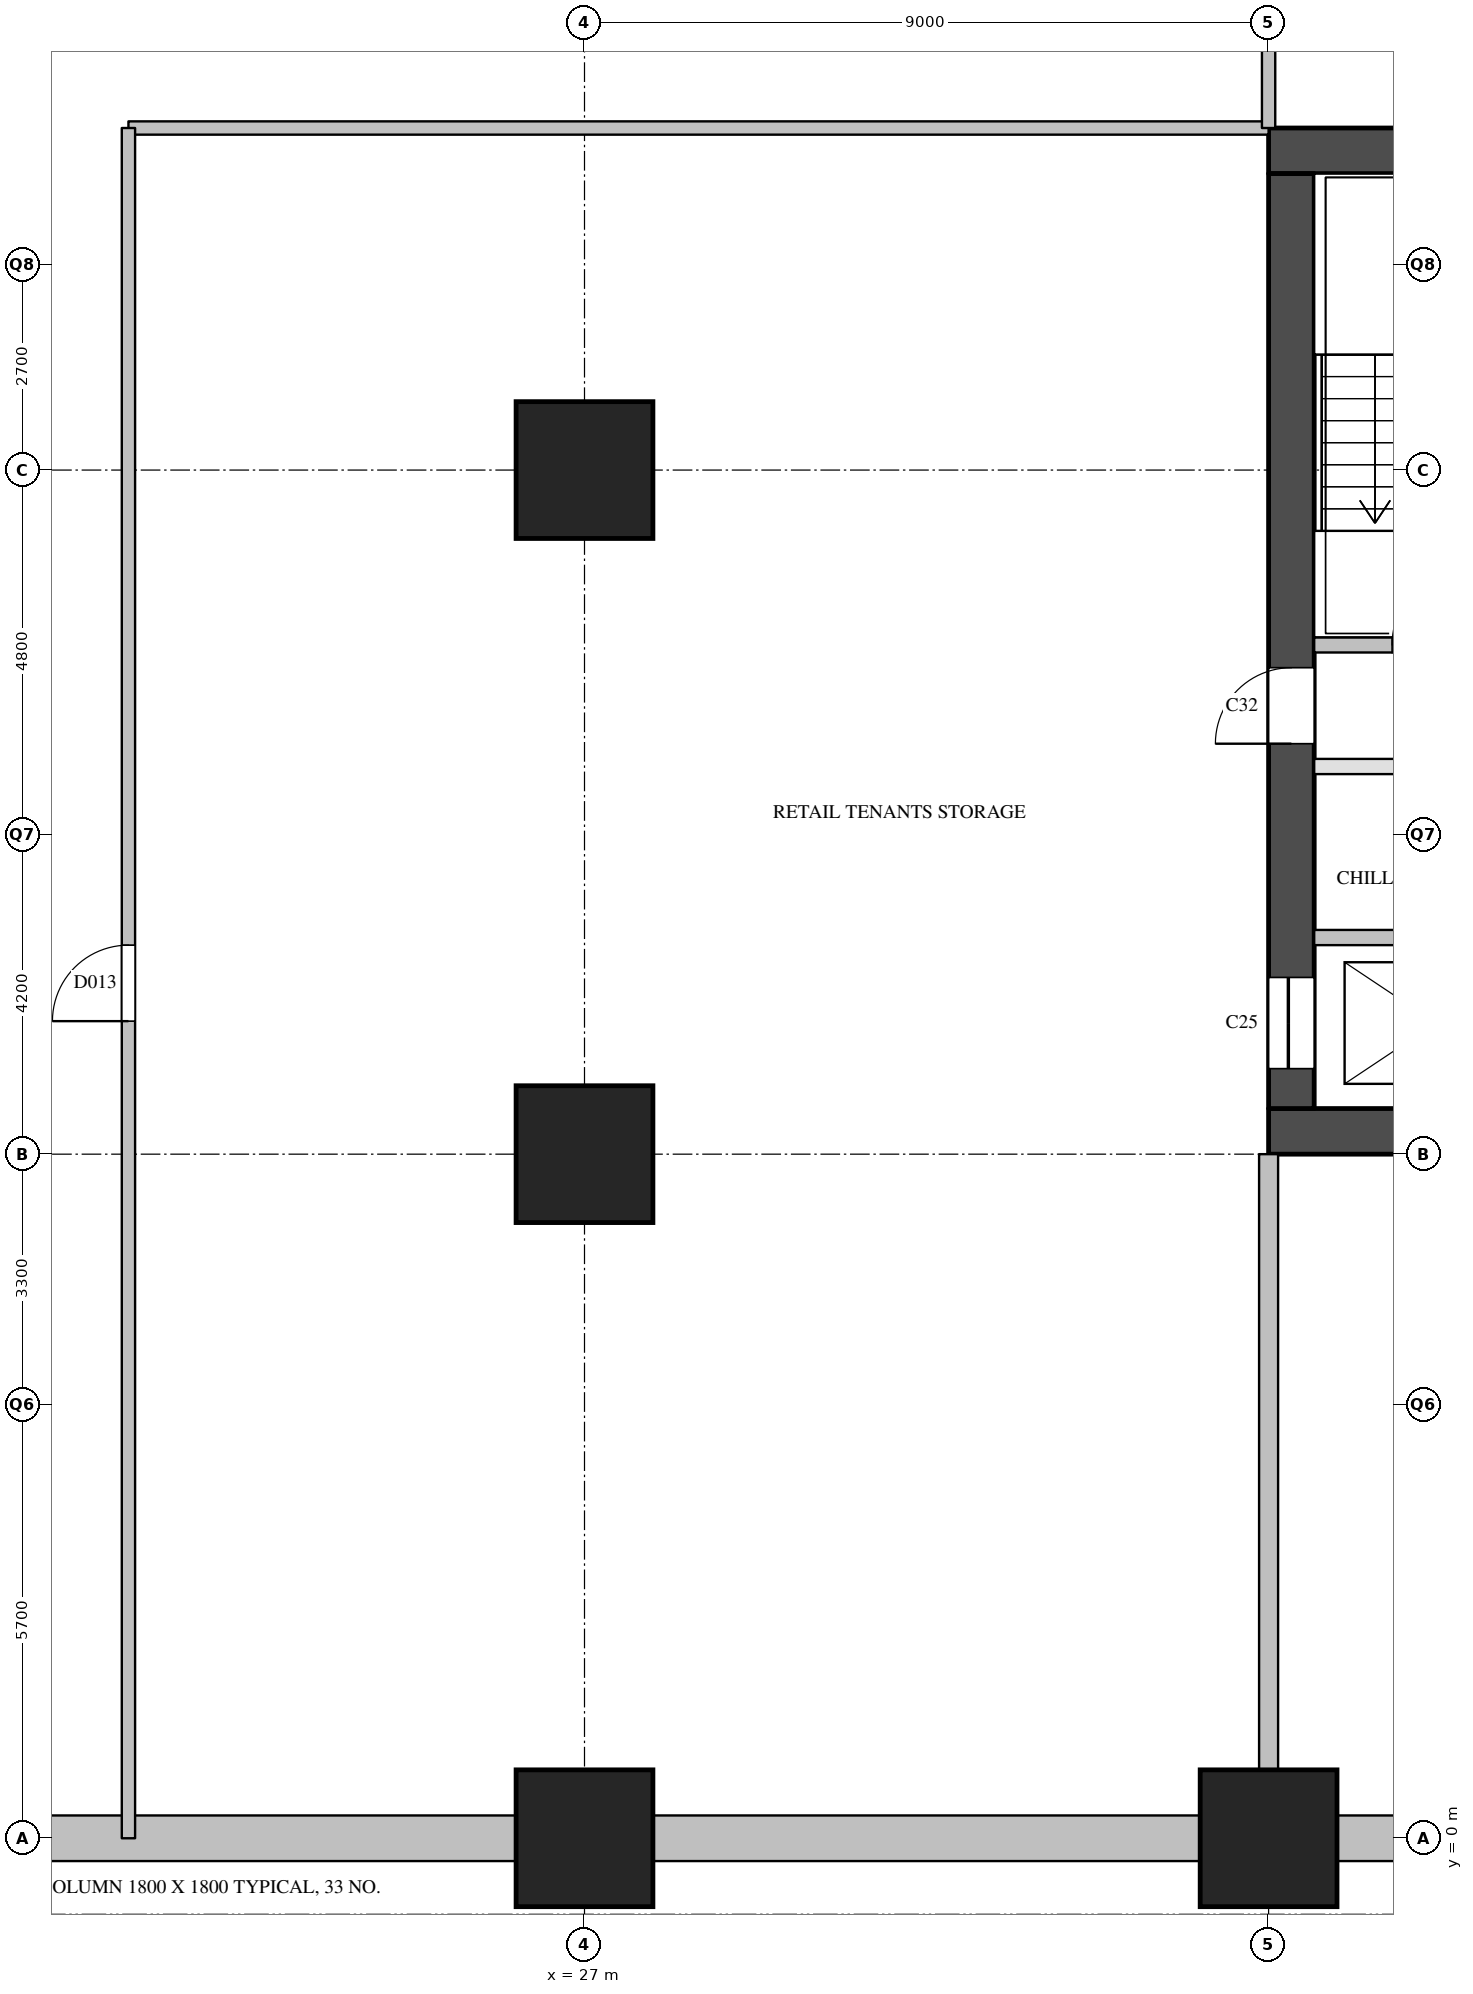
"""IFC4 building model, lengths in metres.
Left out: names, types, materials, properties, quantities, classifications, styles, units other than length and angle.
Written with IfcOpenShell. Run it as: python <this file> out.ifc"""

import sys

from ifc_helpers import new_model, si_unit, direction, frame, frame_2d, origin, origin_2d, place, context, subcontext, project, spatial, rectangle, extrude, element, fill, save


model = new_model("IFC4")
c1 = context("Model", 3, precision=1e-05, world=origin(), true_north=direction((0.0, 1.0)))
c2 = subcontext(c1, "Body", "Model", "MODEL_VIEW")
j1 = project(units=[si_unit("LENGTHUNIT", "METRE"), si_unit("PLANEANGLEUNIT", "RADIAN")], contexts=[c1])
p1 = place(None, origin())
s1 = spatial("IfcSite", under=j1, at=p1, CompositionType="ELEMENT")
p2 = place(p1, origin())
s2 = spatial("IfcBuilding", under=s1, at=p2, CompositionType="ELEMENT")
p3 = place(p2, frame((0.0, 0.0, -6.0)))
s3 = spatial("IfcBuildingStorey", under=s2, at=p3, CompositionType="ELEMENT", Elevation=-6.0)
for number, where, z_axis, x_axis in (
    (1, (27.0, 0.0, 0.0), (0.0, 0.0, 1.0), (1.0, 0.0, 0.0)),
    (2, (27.0, 9.0, 0.0), (0.0, 0.0, 1.0), (1.0, 0.0, 0.0)),
    (3, (27.0, 18.0, 0.0), (0.0, 0.0, 1.0), (1.0, 0.0, 0.0)),
    (4, (36.0, 0.0, 0.0), (0.0, 0.0, 1.0), (1.0, 0.0, 0.0)),
):
    element("IfcColumn", number, at=place(p3, frame(where, z_axis=z_axis, x_axis=x_axis)), inside=s3, PredefinedType="COLUMN", context=c2, shape_type="SweptSolid", body=[
        extrude(rectangle(XDim=1.8, YDim=1.8, at=origin_2d()), origin(), (0.0, 0.0, 1.0), 6.0),
    ])
for number, where, z_axis, x_axis in (
    (5, (18.9, 0.0, 0.0), (0.0, 0.0, 1.0), (1.0, 0.0, 0.0)),
    (6, (27.9, 0.0, 0.0), (0.0, 0.0, 1.0), (1.0, 0.0, 0.0)),
    (7, (36.9, 0.0, 0.0), (0.0, 0.0, 1.0), (1.0, 0.0, 0.0)),
):
    element("IfcWall", number, at=place(p3, frame(where, z_axis=z_axis, x_axis=x_axis)), inside=s3, PredefinedType="SOLIDWALL", context=c2, shape_type="SweptSolid", body=[
        extrude(rectangle(XDim=7.2, YDim=0.6, at=frame_2d((3.6, 0.0))), origin(), (0.0, 0.0, 1.0), 5.59),
    ])
for number, where, z_axis, x_axis in (
    (8, (36.0, 9.3, 0.0), (0.0, 0.0, 1.0), (1.0, 0.0, 0.0)),
    (9, (36.0, 22.2, 0.0), (0.0, 0.0, 1.0), (1.0, 0.0, 0.0)),
):
    element("IfcWall", number, at=place(p3, frame(where, z_axis=z_axis, x_axis=x_axis)), inside=s3, PredefinedType="SHEAR", context=c2, shape_type="SweptSolid", body=[
        extrude(rectangle(XDim=9.0, YDim=0.6, at=frame_2d((4.5, 0.0))), origin(), (0.0, 0.0, 1.0), 5.59),
    ])
p4 = place(p3, frame((36.3, 9.6, 0.0), z_axis=(0.0, 0.0, 1.0), x_axis=(0.0, 1.0, 0.0)))
e10 = element("IfcWall", 10, at=p4, inside=s3, PredefinedType="SHEAR", context=c2, shape_type="SweptSolid", body=[
    extrude(rectangle(XDim=12.3, YDim=0.6, at=frame_2d((6.15, 0.0))), origin(), (0.0, 0.0, 1.0), 5.59),
])
p5 = place(p4, frame((0.525, 0.0, 0.0)))
e11 = element("IfcOpeningElement", 11, at=p5, cuts=e10, PredefinedType="OPENING", context=c2, shape_type="SweptSolid", body=[
    extrude(rectangle(XDim=1.2, YDim=2.1, at=frame_2d((0.6, 1.05))), frame((0.0, 0.31, 0.0), z_axis=(0.0, -1.0, 0.0), x_axis=(1.0, 0.0, 0.0)), (0.0, 0.0, 1.0), 0.62),
])
p6 = place(p4, frame((4.8, 0.0, 0.0)))
e12 = element("IfcOpeningElement", 12, at=p6, cuts=e10, PredefinedType="OPENING", context=c2, shape_type="SweptSolid", body=[
    extrude(rectangle(XDim=1.0, YDim=2.1, at=frame_2d((0.5, 1.05))), frame((0.0, 0.31, 0.0), z_axis=(0.0, -1.0, 0.0), x_axis=(1.0, 0.0, 0.0)), (0.0, 0.0, 1.0), 0.62),
])
p7 = place(p3, frame((36.6, 11.85, 0.0), z_axis=(0.0, 0.0, 1.0), x_axis=(1.0, 0.0, 0.0)))
e13 = element("IfcWall", 13, at=p7, inside=s3, PredefinedType="SOLIDWALL", context=c2, shape_type="SweptSolid", body=[
    extrude(rectangle(XDim=3.2, YDim=0.2, at=frame_2d((1.6, 0.0))), origin(), (0.0, 0.0, 1.0), 5.59),
])
p8 = place(p3, frame((36.6, 14.1, 0.0), z_axis=(0.0, 0.0, 1.0), x_axis=(1.0, 0.0, 0.0)))
e14 = element("IfcWall", 14, at=p8, inside=s3, PredefinedType="PARTITIONING", context=c2, shape_type="SweptSolid", body=[
    extrude(rectangle(XDim=6.0, YDim=0.2, at=frame_2d((3.0, 0.0))), origin(), (0.0, 0.0, 1.0), 5.59),
])
p9 = place(p8, frame((2.25, 0.0, 0.0)))
e15 = element("IfcOpeningElement", 15, at=p9, cuts=e14, PredefinedType="OPENING", context=c2, shape_type="SweptSolid", body=[
    extrude(rectangle(XDim=1.5, YDim=2.1, at=frame_2d((0.75, 1.05))), frame((0.0, 0.11, 0.0), z_axis=(0.0, -1.0, 0.0), x_axis=(1.0, 0.0, 0.0)), (0.0, 0.0, 1.0), 0.22),
])
p10 = place(p3, frame((36.6, 15.7, 0.0), z_axis=(0.0, 0.0, 1.0), x_axis=(1.0, 0.0, 0.0)))
e16 = element("IfcWall", 16, at=p10, inside=s3, PredefinedType="SOLIDWALL", context=c2, shape_type="SweptSolid", body=[
    extrude(rectangle(XDim=3.05, YDim=0.2, at=frame_2d((1.525, 0.0))), origin(), (0.0, 0.0, 1.0), 5.59),
])
p11 = place(p10, frame((1.025, 0.0, 0.0)))
e17 = element("IfcOpeningElement", 17, at=p11, cuts=e16, PredefinedType="OPENING", context=c2, shape_type="SweptSolid", body=[
    extrude(rectangle(XDim=1.1, YDim=2.1, at=frame_2d((0.55, 1.05))), frame((0.0, 0.11, 0.0), z_axis=(0.0, -1.0, 0.0), x_axis=(1.0, 0.0, 0.0)), (0.0, 0.0, 1.0), 0.22),
])
p12 = place(p3, frame((21.0, 22.5, 0.0), z_axis=(0.0, 0.0, 1.0), x_axis=(1.0, 0.0, 0.0)))
e18 = element("IfcWall", 18, at=p12, inside=s3, PredefinedType="PARTITIONING", context=c2, shape_type="SweptSolid", body=[
    extrude(rectangle(XDim=15.0, YDim=0.175, at=frame_2d((7.5, 0.0))), origin(), (0.0, 0.0, 1.0), 5.59),
])
p13 = place(p3, frame((21.0, 0.0, 0.0), z_axis=(0.0, 0.0, 1.0), x_axis=(0.0, 1.0, 0.0)))
e19 = element("IfcWall", 19, at=p13, inside=s3, PredefinedType="PARTITIONING", context=c2, shape_type="SweptSolid", body=[
    extrude(rectangle(XDim=22.5, YDim=0.175, at=frame_2d((11.25, 0.0))), origin(), (0.0, 0.0, 1.0), 5.59),
])
p14 = place(p13, frame((10.75, 0.0, 0.0)))
e20 = element("IfcOpeningElement", 20, at=p14, cuts=e19, PredefinedType="OPENING", context=c2, shape_type="SweptSolid", body=[
    extrude(rectangle(XDim=1.0, YDim=2.1, at=frame_2d((0.5, 1.05))), frame((0.0, 0.097, 0.0), z_axis=(0.0, -1.0, 0.0), x_axis=(1.0, 0.0, 0.0)), (0.0, 0.0, 1.0), 0.195),
])
p15 = place(p3, frame((36.0, 22.5, 0.0), z_axis=(0.0, 0.0, 1.0), x_axis=(0.0, 1.0, 0.0)))
e21 = element("IfcWall", 21, at=p15, inside=s3, PredefinedType="PARTITIONING", context=c2, shape_type="SweptSolid", body=[
    extrude(rectangle(XDim=6.0, YDim=0.175, at=frame_2d((3.0, 0.0))), origin(), (0.0, 0.0, 1.0), 5.59),
])
p16 = place(p3, frame((36.0, 0.0, 0.0), z_axis=(0.0, 0.0, 1.0), x_axis=(0.0, 1.0, 0.0)))
e22 = element("IfcWall", 22, at=p16, inside=s3, PredefinedType="PARTITIONING", context=c2, shape_type="SweptSolid", body=[
    extrude(rectangle(XDim=9.0, YDim=0.25, at=frame_2d((4.5, 0.0))), origin(), (0.0, 0.0, 1.0), 5.59),
])
p17 = place(p5, origin())
e23 = element("IfcDoor", 23, at=p17, inside=s3, OperationType="SLIDING_TO_LEFT", PredefinedType="DOOR", context=c2, shape_type="SweptSolid", body=[
    extrude(rectangle(XDim=1.2, YDim=2.1, at=frame_2d((0.6, 1.05))), frame((0.0, 0.025, 0.0), z_axis=(0.0, -1.0, 0.0), x_axis=(1.0, 0.0, 0.0)), (0.0, 0.0, 1.0), 0.05),
])
fill(e11, e23)
p18 = place(p11, origin())
e24 = element("IfcDoor", 24, at=p18, inside=s3, OperationType="SINGLE_SWING_RIGHT", PredefinedType="DOOR", context=c2, shape_type="SweptSolid", body=[
    extrude(rectangle(XDim=1.1, YDim=2.1, at=frame_2d((0.55, 1.05))), frame((0.0, 0.025, 0.0), z_axis=(0.0, -1.0, 0.0), x_axis=(1.0, 0.0, 0.0)), (0.0, 0.0, 1.0), 0.05),
])
fill(e17, e24)
p19 = place(p6, origin())
e25 = element("IfcDoor", 25, at=p19, inside=s3, OperationType="SINGLE_SWING_LEFT", PredefinedType="DOOR", context=c2, shape_type="SweptSolid", body=[
    extrude(rectangle(XDim=1.0, YDim=2.1, at=frame_2d((0.5, 1.05))), frame((0.0, 0.025, 0.0), z_axis=(0.0, -1.0, 0.0), x_axis=(1.0, 0.0, 0.0)), (0.0, 0.0, 1.0), 0.05),
])
fill(e12, e25)
p20 = place(p14, origin())
e26 = element("IfcDoor", 26, at=p20, inside=s3, OperationType="SINGLE_SWING_LEFT", PredefinedType="DOOR", context=c2, shape_type="SweptSolid", body=[
    extrude(rectangle(XDim=1.0, YDim=2.1, at=frame_2d((0.5, 1.05))), frame((0.0, 0.025, 0.0), z_axis=(0.0, -1.0, 0.0), x_axis=(1.0, 0.0, 0.0)), (0.0, 0.0, 1.0), 0.05),
])
fill(e20, e26)
save(model, sys.argv[1])
